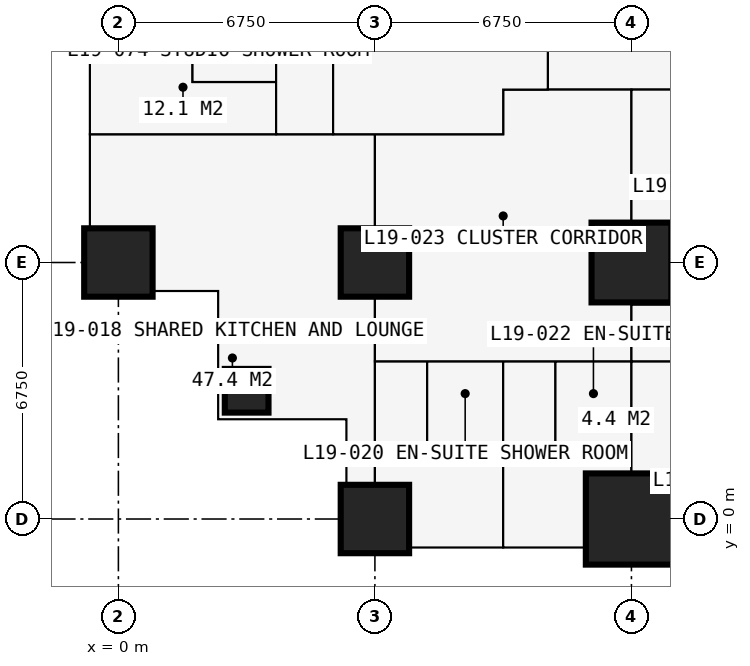
"""IFC4 building model, lengths in metres.
Left out: names, types, materials, properties, quantities, classifications, styles, units other than length and angle.
Written with IfcOpenShell. Run it as: python <this file> out.ifc"""

import sys

from ifc_helpers import new_model, si_unit, direction, frame, frame_2d, origin, origin_2d, place, context, subcontext, project, spatial, rectangle, extrude, element, fill, save


model = new_model("IFC4")
c1 = context("Model", 3, precision=1e-05, world=origin(), true_north=direction((0.0, 1.0)))
c2 = subcontext(c1, "Body", "Model", "MODEL_VIEW")
j1 = project(units=[si_unit("LENGTHUNIT", "METRE"), si_unit("PLANEANGLEUNIT", "RADIAN")], contexts=[c1])
p1 = place(None, origin())
s1 = spatial("IfcSite", under=j1, at=p1, CompositionType="ELEMENT")
p2 = place(p1, origin())
s2 = spatial("IfcBuilding", under=s1, at=p2, CompositionType="ELEMENT")
p3 = place(p2, frame((0.0, 0.0, 72.0)))
s3 = spatial("IfcBuildingStorey", under=s2, at=p3, CompositionType="ELEMENT", Elevation=72.0)
p4 = place(p3, frame((0.0, 6.75, 0.0), z_axis=(0.0, 0.0, 1.0), x_axis=(1.0, 0.0, 0.0)))
e1 = element("IfcColumn", 1, at=p4, inside=s3, PredefinedType="COLUMN", context=c2, shape_type="SweptSolid", body=[
    extrude(rectangle(XDim=1.8, YDim=1.8, at=origin_2d()), origin(), (0.0, 0.0, 1.0), 3.6),
])
p5 = place(p3, frame((3.375, 3.375, 0.0), z_axis=(0.0, 0.0, 1.0), x_axis=(1.0, 0.0, 0.0)))
e2 = element("IfcColumn", 2, at=p5, inside=s3, PredefinedType="COLUMN", context=c2, shape_type="SweptSolid", body=[
    extrude(rectangle(XDim=1.15, YDim=1.15, at=origin_2d()), origin(), (0.0, 0.0, 1.0), 3.6),
])
for number, where, z_axis, x_axis in (
    (3, (6.75, 0.0, 0.0), (0.0, 0.0, 1.0), (1.0, 0.0, 0.0)),
    (4, (6.75, 6.75, 0.0), (0.0, 0.0, 1.0), (1.0, 0.0, 0.0)),
):
    element("IfcColumn", number, at=place(p3, frame(where, z_axis=z_axis, x_axis=x_axis)), inside=s3, PredefinedType="COLUMN", context=c2, shape_type="SweptSolid", body=[
        extrude(rectangle(XDim=1.8, YDim=1.8, at=origin_2d()), origin(), (0.0, 0.0, 1.0), 3.6),
    ])
p6 = place(p3, frame((13.5, 0.0, 0.0), z_axis=(0.0, 0.0, 1.0), x_axis=(1.0, 0.0, 0.0)))
e5 = element("IfcColumn", 5, at=p6, inside=s3, PredefinedType="COLUMN", context=c2, shape_type="SweptSolid", body=[
    extrude(rectangle(XDim=2.4, YDim=2.4, at=origin_2d()), origin(), (0.0, 0.0, 1.0), 3.6),
])
p7 = place(p3, frame((13.5, 6.75, 0.0), z_axis=(0.0, 0.0, 1.0), x_axis=(1.0, 0.0, 0.0)))
e6 = element("IfcColumn", 6, at=p7, inside=s3, PredefinedType="COLUMN", context=c2, shape_type="SweptSolid", body=[
    extrude(rectangle(XDim=2.1, YDim=2.1, at=origin_2d()), origin(), (0.0, 0.0, 1.0), 3.6),
])
p8 = place(p3, frame((-0.75, 6.0, 0.0), z_axis=(0.0, 0.0, 1.0), x_axis=(1.0, 0.0, 0.0)))
e7 = element("IfcWall", 7, at=p8, inside=s3, PredefinedType="SOLIDWALL", context=c2, shape_type="SweptSolid", body=[
    extrude(rectangle(XDim=3.375, YDim=0.3, at=frame_2d((1.688, 0.0))), origin(), (0.0, 0.0, 1.0), 3.3),
])
p9 = place(p8, frame((1.833, 0.0, 0.9)))
e8 = element("IfcOpeningElement", 8, at=p9, cuts=e7, PredefinedType="OPENING", context=c2, shape_type="SweptSolid", body=[
    extrude(rectangle(XDim=1.2, YDim=1.8, at=frame_2d((0.6, 0.9))), frame((0.0, 0.16, 0.0), z_axis=(0.0, -1.0, 0.0), x_axis=(1.0, 0.0, 0.0)), (0.0, 0.0, 1.0), 0.32),
])
p10 = place(p3, frame((2.625, 6.0, 0.0), z_axis=(0.0, 0.0, 1.0), x_axis=(0.0, -1.0, 0.0)))
e9 = element("IfcWall", 9, at=p10, inside=s3, PredefinedType="SOLIDWALL", context=c2, shape_type="SweptSolid", body=[
    extrude(rectangle(XDim=3.375, YDim=0.3, at=frame_2d((1.688, 0.0))), origin(), (0.0, 0.0, 1.0), 3.3),
])
p11 = place(p10, frame((0.788, 0.0, 0.6)))
e10 = element("IfcOpeningElement", 10, at=p11, cuts=e9, PredefinedType="OPENING", context=c2, shape_type="SweptSolid", body=[
    extrude(rectangle(XDim=1.8, YDim=2.1, at=frame_2d((0.9, 1.05))), frame((0.0, 0.16, 0.0), z_axis=(0.0, -1.0, 0.0), x_axis=(1.0, 0.0, 0.0)), (0.0, 0.0, 1.0), 0.32),
])
p12 = place(p3, frame((2.625, 2.625, 0.0), z_axis=(0.0, 0.0, 1.0), x_axis=(1.0, 0.0, 0.0)))
e11 = element("IfcWall", 11, at=p12, inside=s3, PredefinedType="SOLIDWALL", context=c2, shape_type="SweptSolid", body=[
    extrude(rectangle(XDim=3.375, YDim=0.3, at=frame_2d((1.688, 0.0))), origin(), (0.0, 0.0, 1.0), 3.3),
])
p13 = place(p12, frame((0.788, 0.0, 0.6)))
e12 = element("IfcOpeningElement", 12, at=p13, cuts=e11, PredefinedType="OPENING", context=c2, shape_type="SweptSolid", body=[
    extrude(rectangle(XDim=1.8, YDim=2.1, at=frame_2d((0.9, 1.05))), frame((0.0, 0.16, 0.0), z_axis=(0.0, -1.0, 0.0), x_axis=(1.0, 0.0, 0.0)), (0.0, 0.0, 1.0), 0.32),
])
p14 = place(p3, frame((6.0, 2.625, 0.0), z_axis=(0.0, 0.0, 1.0), x_axis=(0.0, -1.0, 0.0)))
e13 = element("IfcWall", 13, at=p14, inside=s3, PredefinedType="SOLIDWALL", context=c2, shape_type="SweptSolid", body=[
    extrude(rectangle(XDim=3.375, YDim=0.3, at=frame_2d((1.688, 0.0))), origin(), (0.0, 0.0, 1.0), 3.3),
])
p15 = place(p14, frame((0.343, 0.0, 0.9)))
e14 = element("IfcOpeningElement", 14, at=p15, cuts=e13, PredefinedType="OPENING", context=c2, shape_type="SweptSolid", body=[
    extrude(rectangle(XDim=1.2, YDim=1.8, at=frame_2d((0.6, 0.9))), frame((0.0, 0.16, 0.0), z_axis=(0.0, -1.0, 0.0), x_axis=(1.0, 0.0, 0.0)), (0.0, 0.0, 1.0), 0.32),
])
p16 = place(p3, frame((-0.734, 10.125, 0.0), z_axis=(0.0, 0.0, 1.0), x_axis=(1.0, 0.0, 0.0)))
e15 = element("IfcWall", 15, at=p16, inside=s3, PredefinedType="PARTITIONING", context=c2, shape_type="SweptSolid", body=[
    extrude(rectangle(XDim=10.859, YDim=0.15, at=frame_2d((5.429, 0.0))), origin(), (0.0, 0.0, 1.0), 3.3),
])
p17 = place(p16, frame((5.134, 0.0, 0.0)))
e16 = element("IfcOpeningElement", 16, at=p17, cuts=e15, PredefinedType="OPENING", context=c2, shape_type="SweptSolid", body=[
    extrude(rectangle(XDim=1.0, YDim=2.2, at=frame_2d((0.5, 1.1))), frame((0.0, 0.085, 0.0), z_axis=(0.0, -1.0, 0.0), x_axis=(1.0, 0.0, 0.0)), (0.0, 0.0, 1.0), 0.17),
])
p18 = place(p3, frame((1.95, 11.5, 0.0), z_axis=(0.0, 0.0, 1.0), x_axis=(0.0, 1.0, 0.0)))
e17 = element("IfcWall", 17, at=p18, inside=s3, PredefinedType="PARTITIONING", context=c2, shape_type="SweptSolid", body=[
    extrude(rectangle(XDim=2.0, YDim=0.1, at=frame_2d((1.0, 0.0))), origin(), (0.0, 0.0, 1.0), 3.3),
])
p19 = place(p3, frame((1.95, 11.5, 0.0), z_axis=(0.0, 0.0, 1.0), x_axis=(1.0, 0.0, 0.0)))
e18 = element("IfcWall", 18, at=p19, inside=s3, PredefinedType="PARTITIONING", context=c2, shape_type="SweptSolid", body=[
    extrude(rectangle(XDim=2.2, YDim=0.1, at=frame_2d((1.1, 0.0))), origin(), (0.0, 0.0, 1.0), 3.3),
])
p20 = place(p19, frame((0.65, 0.0, 0.0)))
e19 = element("IfcOpeningElement", 19, at=p20, cuts=e18, PredefinedType="OPENING", context=c2, shape_type="SweptSolid", body=[
    extrude(rectangle(XDim=0.9, YDim=2.2, at=frame_2d((0.45, 1.1))), frame((0.0, 0.06, 0.0), z_axis=(0.0, -1.0, 0.0), x_axis=(1.0, 0.0, 0.0)), (0.0, 0.0, 1.0), 0.12),
])
p21 = place(p3, frame((4.15, 10.125, 0.0), z_axis=(0.0, 0.0, 1.0), x_axis=(0.0, 1.0, 0.0)))
e20 = element("IfcWall", 20, at=p21, inside=s3, PredefinedType="PARTITIONING", context=c2, shape_type="SweptSolid", body=[
    extrude(rectangle(XDim=23.625, YDim=0.1, at=frame_2d((11.812, 0.0))), origin(), (0.0, 0.0, 1.0), 3.3),
])
p22 = place(p21, frame((7.575, 0.0, 0.0)))
e21 = element("IfcOpeningElement", 21, at=p22, cuts=e20, PredefinedType="OPENING", context=c2, shape_type="SweptSolid", body=[
    extrude(rectangle(XDim=0.95, YDim=2.2, at=frame_2d((0.475, 1.1))), frame((0.0, 0.06, 0.0), z_axis=(0.0, -1.0, 0.0), x_axis=(1.0, 0.0, 0.0)), (0.0, 0.0, 1.0), 0.12),
])
p23 = place(p21, frame((14.325, 0.0, 0.0)))
e22 = element("IfcOpeningElement", 22, at=p23, cuts=e20, PredefinedType="OPENING", context=c2, shape_type="SweptSolid", body=[
    extrude(rectangle(XDim=0.95, YDim=2.2, at=frame_2d((0.475, 1.1))), frame((0.0, 0.06, 0.0), z_axis=(0.0, -1.0, 0.0), x_axis=(1.0, 0.0, 0.0)), (0.0, 0.0, 1.0), 0.12),
])
p24 = place(p21, frame((21.075, 0.0, 0.0)))
e23 = element("IfcOpeningElement", 23, at=p24, cuts=e20, PredefinedType="OPENING", context=c2, shape_type="SweptSolid", body=[
    extrude(rectangle(XDim=0.95, YDim=2.2, at=frame_2d((0.475, 1.1))), frame((0.0, 0.06, 0.0), z_axis=(0.0, -1.0, 0.0), x_axis=(1.0, 0.0, 0.0)), (0.0, 0.0, 1.0), 0.12),
])
p25 = place(p21, frame((0.2, 0.0, 0.0)))
e24 = element("IfcOpeningElement", 24, at=p25, cuts=e20, PredefinedType="OPENING", context=c2, shape_type="SweptSolid", body=[
    extrude(rectangle(XDim=0.95, YDim=2.2, at=frame_2d((0.475, 1.1))), frame((0.0, 0.06, 0.0), z_axis=(0.0, -1.0, 0.0), x_axis=(1.0, 0.0, 0.0)), (0.0, 0.0, 1.0), 0.12),
])
p26 = place(p3, frame((5.65, 10.125, 0.0), z_axis=(0.0, 0.0, 1.0), x_axis=(0.0, 1.0, 0.0)))
e25 = element("IfcWall", 25, at=p26, inside=s3, PredefinedType="PARTITIONING", context=c2, shape_type="SweptSolid", body=[
    extrude(rectangle(XDim=10.762, YDim=0.15, at=frame_2d((5.381, 0.0))), origin(), (0.0, 0.0, 1.0), 3.3),
])
p27 = place(p26, frame((4.9, 0.0, 0.0)))
e26 = element("IfcOpeningElement", 26, at=p27, cuts=e25, PredefinedType="OPENING", context=c2, shape_type="SweptSolid", body=[
    extrude(rectangle(XDim=0.95, YDim=2.2, at=frame_2d((0.475, 1.1))), frame((0.0, 0.085, 0.0), z_axis=(0.0, -1.0, 0.0), x_axis=(1.0, 0.0, 0.0)), (0.0, 0.0, 1.0), 0.17),
])
p28 = place(p3, frame((6.75, -0.734, 0.0), z_axis=(0.0, 0.0, 1.0), x_axis=(0.0, 1.0, 0.0)))
e27 = element("IfcWall", 27, at=p28, inside=s3, PredefinedType="PARTITIONING", context=c2, shape_type="SweptSolid", body=[
    extrude(rectangle(XDim=10.859, YDim=0.15, at=frame_2d((5.429, 0.0))), origin(), (0.0, 0.0, 1.0), 2.802),
])
p29 = place(p3, frame((6.75, 4.15, 0.0), z_axis=(0.0, 0.0, 1.0), x_axis=(1.0, 0.0, 0.0)))
e28 = element("IfcWall", 28, at=p29, inside=s3, PredefinedType="PARTITIONING", context=c2, shape_type="SweptSolid", body=[
    extrude(rectangle(XDim=23.625, YDim=0.1, at=frame_2d((11.812, 0.0))), origin(), (0.0, 0.0, 1.0), 3.3),
])
p30 = place(p29, frame((0.2, 0.0, 0.0)))
e29 = element("IfcOpeningElement", 29, at=p30, cuts=e28, PredefinedType="OPENING", context=c2, shape_type="SweptSolid", body=[
    extrude(rectangle(XDim=0.95, YDim=2.2, at=frame_2d((0.475, 1.1))), frame((0.0, 0.06, 0.0), z_axis=(0.0, -1.0, 0.0), x_axis=(1.0, 0.0, 0.0)), (0.0, 0.0, 1.0), 0.12),
])
p31 = place(p29, frame((3.625, 0.0, 0.0)))
e30 = element("IfcOpeningElement", 30, at=p31, cuts=e28, PredefinedType="OPENING", context=c2, shape_type="SweptSolid", body=[
    extrude(rectangle(XDim=0.95, YDim=2.2, at=frame_2d((0.475, 1.1))), frame((0.0, 0.06, 0.0), z_axis=(0.0, -1.0, 0.0), x_axis=(1.0, 0.0, 0.0)), (0.0, 0.0, 1.0), 0.12),
])
p32 = place(p29, frame((15.1, 0.0, 0.0)))
e31 = element("IfcOpeningElement", 31, at=p32, cuts=e28, PredefinedType="OPENING", context=c2, shape_type="SweptSolid", body=[
    extrude(rectangle(XDim=0.95, YDim=2.2, at=frame_2d((0.475, 1.1))), frame((0.0, 0.06, 0.0), z_axis=(0.0, -1.0, 0.0), x_axis=(1.0, 0.0, 0.0)), (0.0, 0.0, 1.0), 0.12),
])
p33 = place(p29, frame((8.35, 0.0, 0.0)))
e32 = element("IfcOpeningElement", 32, at=p33, cuts=e28, PredefinedType="OPENING", context=c2, shape_type="SweptSolid", body=[
    extrude(rectangle(XDim=0.95, YDim=2.2, at=frame_2d((0.475, 1.1))), frame((0.0, 0.06, 0.0), z_axis=(0.0, -1.0, 0.0), x_axis=(1.0, 0.0, 0.0)), (0.0, 0.0, 1.0), 0.12),
])
p34 = place(p29, frame((20.5, 0.0, 0.0)))
e33 = element("IfcOpeningElement", 33, at=p34, cuts=e28, PredefinedType="OPENING", context=c2, shape_type="SweptSolid", body=[
    extrude(rectangle(XDim=0.95, YDim=2.2, at=frame_2d((0.475, 1.1))), frame((0.0, 0.06, 0.0), z_axis=(0.0, -1.0, 0.0), x_axis=(1.0, 0.0, 0.0)), (0.0, 0.0, 1.0), 0.12),
])
p35 = place(p3, frame((8.125, 1.95, 0.0), z_axis=(0.0, 0.0, 1.0), x_axis=(0.0, 1.0, 0.0)))
e34 = element("IfcWall", 34, at=p35, inside=s3, PredefinedType="PARTITIONING", context=c2, shape_type="SweptSolid", body=[
    extrude(rectangle(XDim=2.2, YDim=0.1, at=frame_2d((1.1, 0.0))), origin(), (0.0, 0.0, 1.0), 3.3),
])
p36 = place(p35, frame((0.65, 0.0, 0.0)))
e35 = element("IfcOpeningElement", 35, at=p36, cuts=e34, PredefinedType="OPENING", context=c2, shape_type="SweptSolid", body=[
    extrude(rectangle(XDim=0.9, YDim=2.2, at=frame_2d((0.45, 1.1))), frame((0.0, 0.06, 0.0), z_axis=(0.0, -1.0, 0.0), x_axis=(1.0, 0.0, 0.0)), (0.0, 0.0, 1.0), 0.12),
])
p37 = place(p3, frame((8.125, 1.95, 0.0), z_axis=(0.0, 0.0, 1.0), x_axis=(1.0, 0.0, 0.0)))
e36 = element("IfcWall", 36, at=p37, inside=s3, PredefinedType="PARTITIONING", context=c2, shape_type="SweptSolid", body=[
    extrude(rectangle(XDim=2.0, YDim=0.1, at=frame_2d((1.0, 0.0))), origin(), (0.0, 0.0, 1.0), 3.3),
])
p38 = place(p3, frame((10.125, -0.734, 0.0), z_axis=(0.0, 0.0, 1.0), x_axis=(0.0, 1.0, 0.0)))
e37 = element("IfcWall", 37, at=p38, inside=s3, PredefinedType="PARTITIONING", context=c2, shape_type="SweptSolid", body=[
    extrude(rectangle(XDim=4.884, YDim=0.175, at=frame_2d((2.442, 0.0))), origin(), (0.0, 0.0, 1.0), 3.3),
])
p39 = place(p3, frame((10.125, 10.125, 0.0), z_axis=(0.0, 0.0, 1.0), x_axis=(0.0, 1.0, 0.0)))
e38 = element("IfcWall", 38, at=p39, inside=s3, PredefinedType="PARTITIONING", context=c2, shape_type="SweptSolid", body=[
    extrude(rectangle(XDim=1.175, YDim=0.15, at=frame_2d((0.587, 0.0))), origin(), (0.0, 0.0, 1.0), 3.3),
])
p40 = place(p3, frame((10.125, 11.3, 0.0), z_axis=(0.0, 0.0, 1.0), x_axis=(1.0, 0.0, 0.0)))
e39 = element("IfcWall", 39, at=p40, inside=s3, PredefinedType="PARTITIONING", context=c2, shape_type="SweptSolid", body=[
    extrude(rectangle(XDim=20.675, YDim=0.15, at=frame_2d((10.337, 0.0))), origin(), (0.0, 0.0, 1.0), 3.3),
])
p41 = place(p40, frame((1.775, 0.0, 0.0)))
e40 = element("IfcOpeningElement", 40, at=p41, cuts=e39, PredefinedType="OPENING", context=c2, shape_type="SweptSolid", body=[
    extrude(rectangle(XDim=1.0, YDim=2.2, at=frame_2d((0.5, 1.1))), frame((0.0, 0.085, 0.0), z_axis=(0.0, -1.0, 0.0), x_axis=(1.0, 0.0, 0.0)), (0.0, 0.0, 1.0), 0.17),
])
p42 = place(p40, frame((11.312, 0.0, 0.0)))
e41 = element("IfcOpeningElement", 41, at=p42, cuts=e39, PredefinedType="OPENING", context=c2, shape_type="SweptSolid", body=[
    extrude(rectangle(XDim=1.0, YDim=2.2, at=frame_2d((0.5, 1.1))), frame((0.0, 0.085, 0.0), z_axis=(0.0, -1.0, 0.0), x_axis=(1.0, 0.0, 0.0)), (0.0, 0.0, 1.0), 0.17),
])
p43 = place(p3, frame((11.3, 11.3, 0.0), z_axis=(0.0, 0.0, 1.0), x_axis=(0.0, 1.0, 0.0)))
e42 = element("IfcWall", 42, at=p43, inside=s3, PredefinedType="PARTITIONING", context=c2, shape_type="SweptSolid", body=[
    extrude(rectangle(XDim=19.075, YDim=0.15, at=frame_2d((9.538, 0.0))), origin(), (0.0, 0.0, 1.0), 3.3),
])
p44 = place(p43, frame((10.137, 0.0, 0.0)))
e43 = element("IfcOpeningElement", 43, at=p44, cuts=e42, PredefinedType="OPENING", context=c2, shape_type="SweptSolid", body=[
    extrude(rectangle(XDim=1.0, YDim=2.2, at=frame_2d((0.5, 1.1))), frame((0.0, 0.085, 0.0), z_axis=(0.0, -1.0, 0.0), x_axis=(1.0, 0.0, 0.0)), (0.0, 0.0, 1.0), 0.17),
])
p45 = place(p3, frame((11.5, 1.95, 0.0), z_axis=(0.0, 0.0, 1.0), x_axis=(0.0, 1.0, 0.0)))
e44 = element("IfcWall", 44, at=p45, inside=s3, PredefinedType="PARTITIONING", context=c2, shape_type="SweptSolid", body=[
    extrude(rectangle(XDim=2.2, YDim=0.1, at=frame_2d((1.1, 0.0))), origin(), (0.0, 0.0, 1.0), 3.3),
])
p46 = place(p45, frame((0.65, 0.0, 0.0)))
e45 = element("IfcOpeningElement", 45, at=p46, cuts=e44, PredefinedType="OPENING", context=c2, shape_type="SweptSolid", body=[
    extrude(rectangle(XDim=0.9, YDim=2.2, at=frame_2d((0.45, 1.1))), frame((0.0, 0.06, 0.0), z_axis=(0.0, -1.0, 0.0), x_axis=(1.0, 0.0, 0.0)), (0.0, 0.0, 1.0), 0.12),
])
p47 = place(p3, frame((11.5, 1.95, 0.0), z_axis=(0.0, 0.0, 1.0), x_axis=(1.0, 0.0, 0.0)))
e46 = element("IfcWall", 46, at=p47, inside=s3, PredefinedType="PARTITIONING", context=c2, shape_type="SweptSolid", body=[
    extrude(rectangle(XDim=2.0, YDim=0.1, at=frame_2d((1.0, 0.0))), origin(), (0.0, 0.0, 1.0), 3.3),
])
p48 = place(p3, frame((13.5, -0.734, 0.0), z_axis=(0.0, 0.0, 1.0), x_axis=(0.0, 1.0, 0.0)))
e47 = element("IfcWall", 47, at=p48, inside=s3, PredefinedType="PARTITIONING", context=c2, shape_type="SweptSolid", body=[
    extrude(rectangle(XDim=12.034, YDim=0.15, at=frame_2d((6.017, 0.0))), origin(), (0.0, 0.0, 1.0), 2.802),
])
p49 = place(p3, frame((13.5, 5.65, 0.0), z_axis=(0.0, 0.0, 1.0), x_axis=(1.0, 0.0, 0.0)))
e48 = element("IfcWall", 48, at=p49, inside=s3, PredefinedType="PARTITIONING", context=c2, shape_type="SweptSolid", body=[
    extrude(rectangle(XDim=7.387, YDim=0.15, at=frame_2d((3.694, 0.0))), origin(), (0.0, 0.0, 1.0), 3.3),
])
p50 = place(p49, frame((3.2, 0.0, 0.0)))
e49 = element("IfcOpeningElement", 49, at=p50, cuts=e48, PredefinedType="OPENING", context=c2, shape_type="SweptSolid", body=[
    extrude(rectangle(XDim=0.95, YDim=2.2, at=frame_2d((0.475, 1.1))), frame((0.0, 0.085, 0.0), z_axis=(0.0, -1.0, 0.0), x_axis=(1.0, 0.0, 0.0)), (0.0, 0.0, 1.0), 0.17),
])
p51 = place(p9, origin())
e50 = element("IfcWindow", 50, at=p51, inside=s3, PartitioningType="SINGLE_PANEL", PredefinedType="WINDOW", context=c2, shape_type="SweptSolid", body=[
    extrude(rectangle(XDim=1.2, YDim=1.8, at=frame_2d((0.6, 0.9))), frame((0.0, 0.03, 0.0), z_axis=(0.0, -1.0, 0.0), x_axis=(1.0, 0.0, 0.0)), (0.0, 0.0, 1.0), 0.06),
])
fill(e8, e50)
p52 = place(p11, origin())
e51 = element("IfcWindow", 51, at=p52, inside=s3, PartitioningType="SINGLE_PANEL", PredefinedType="WINDOW", context=c2, shape_type="SweptSolid", body=[
    extrude(rectangle(XDim=1.8, YDim=2.1, at=frame_2d((0.9, 1.05))), frame((0.0, 0.03, 0.0), z_axis=(0.0, -1.0, 0.0), x_axis=(1.0, 0.0, 0.0)), (0.0, 0.0, 1.0), 0.06),
])
fill(e10, e51)
p53 = place(p13, origin())
e52 = element("IfcWindow", 52, at=p53, inside=s3, PartitioningType="SINGLE_PANEL", PredefinedType="WINDOW", context=c2, shape_type="SweptSolid", body=[
    extrude(rectangle(XDim=1.8, YDim=2.1, at=frame_2d((0.9, 1.05))), frame((0.0, 0.03, 0.0), z_axis=(0.0, -1.0, 0.0), x_axis=(1.0, 0.0, 0.0)), (0.0, 0.0, 1.0), 0.06),
])
fill(e12, e52)
p54 = place(p15, origin())
e53 = element("IfcWindow", 53, at=p54, inside=s3, PartitioningType="SINGLE_PANEL", PredefinedType="WINDOW", context=c2, shape_type="SweptSolid", body=[
    extrude(rectangle(XDim=1.2, YDim=1.8, at=frame_2d((0.6, 0.9))), frame((0.0, 0.03, 0.0), z_axis=(0.0, -1.0, 0.0), x_axis=(1.0, 0.0, 0.0)), (0.0, 0.0, 1.0), 0.06),
])
fill(e14, e53)
p55 = place(p17, origin())
e54 = element("IfcDoor", 54, at=p55, inside=s3, OperationType="SINGLE_SWING_LEFT", PredefinedType="DOOR", context=c2, shape_type="SweptSolid", body=[
    extrude(rectangle(XDim=1.0, YDim=2.2, at=frame_2d((0.5, 1.1))), frame((0.0, 0.025, 0.0), z_axis=(0.0, -1.0, 0.0), x_axis=(1.0, 0.0, 0.0)), (0.0, 0.0, 1.0), 0.05),
])
fill(e16, e54)
p56 = place(p30, origin())
e55 = element("IfcDoor", 55, at=p56, inside=s3, OperationType="SINGLE_SWING_LEFT", PredefinedType="DOOR", context=c2, shape_type="SweptSolid", body=[
    extrude(rectangle(XDim=0.95, YDim=2.2, at=frame_2d((0.475, 1.1))), frame((0.0, 0.025, 0.0), z_axis=(0.0, -1.0, 0.0), x_axis=(1.0, 0.0, 0.0)), (0.0, 0.0, 1.0), 0.05),
])
fill(e29, e55)
p57 = place(p36, origin())
e56 = element("IfcDoor", 56, at=p57, inside=s3, OperationType="SINGLE_SWING_RIGHT", PredefinedType="DOOR", context=c2, shape_type="SweptSolid", body=[
    extrude(rectangle(XDim=0.9, YDim=2.2, at=frame_2d((0.45, 1.1))), frame((0.0, 0.025, 0.0), z_axis=(0.0, -1.0, 0.0), x_axis=(1.0, 0.0, 0.0)), (0.0, 0.0, 1.0), 0.05),
])
fill(e35, e56)
p58 = place(p31, origin())
e57 = element("IfcDoor", 57, at=p58, inside=s3, OperationType="SINGLE_SWING_LEFT", PredefinedType="DOOR", context=c2, shape_type="SweptSolid", body=[
    extrude(rectangle(XDim=0.95, YDim=2.2, at=frame_2d((0.475, 1.1))), frame((0.0, 0.025, 0.0), z_axis=(0.0, -1.0, 0.0), x_axis=(1.0, 0.0, 0.0)), (0.0, 0.0, 1.0), 0.05),
])
fill(e30, e57)
p59 = place(p46, origin())
e58 = element("IfcDoor", 58, at=p59, inside=s3, OperationType="SINGLE_SWING_RIGHT", PredefinedType="DOOR", context=c2, shape_type="SweptSolid", body=[
    extrude(rectangle(XDim=0.9, YDim=2.2, at=frame_2d((0.45, 1.1))), frame((0.0, 0.025, 0.0), z_axis=(0.0, -1.0, 0.0), x_axis=(1.0, 0.0, 0.0)), (0.0, 0.0, 1.0), 0.05),
])
fill(e45, e58)
p60 = place(p41, origin())
e59 = element("IfcDoor", 59, at=p60, inside=s3, OperationType="SINGLE_SWING_LEFT", PredefinedType="DOOR", context=c2, shape_type="SweptSolid", body=[
    extrude(rectangle(XDim=1.0, YDim=2.2, at=frame_2d((0.5, 1.1))), frame((0.0, 0.025, 0.0), z_axis=(0.0, -1.0, 0.0), x_axis=(1.0, 0.0, 0.0)), (0.0, 0.0, 1.0), 0.05),
])
fill(e40, e59)
p61 = place(p25, origin())
e60 = element("IfcDoor", 60, at=p61, inside=s3, OperationType="SINGLE_SWING_LEFT", PredefinedType="DOOR", context=c2, shape_type="SweptSolid", body=[
    extrude(rectangle(XDim=0.95, YDim=2.2, at=frame_2d((0.475, 1.1))), frame((0.0, 0.025, 0.0), z_axis=(0.0, -1.0, 0.0), x_axis=(1.0, 0.0, 0.0)), (0.0, 0.0, 1.0), 0.05),
])
fill(e24, e60)
p62 = place(p20, origin())
e61 = element("IfcDoor", 61, at=p62, inside=s3, OperationType="SINGLE_SWING_RIGHT", PredefinedType="DOOR", context=c2, shape_type="SweptSolid", body=[
    extrude(rectangle(XDim=0.9, YDim=2.2, at=frame_2d((0.45, 1.1))), frame((0.0, 0.025, 0.0), z_axis=(0.0, -1.0, 0.0), x_axis=(1.0, 0.0, 0.0)), (0.0, 0.0, 1.0), 0.05),
])
fill(e19, e61)
save(model, sys.argv[1])
